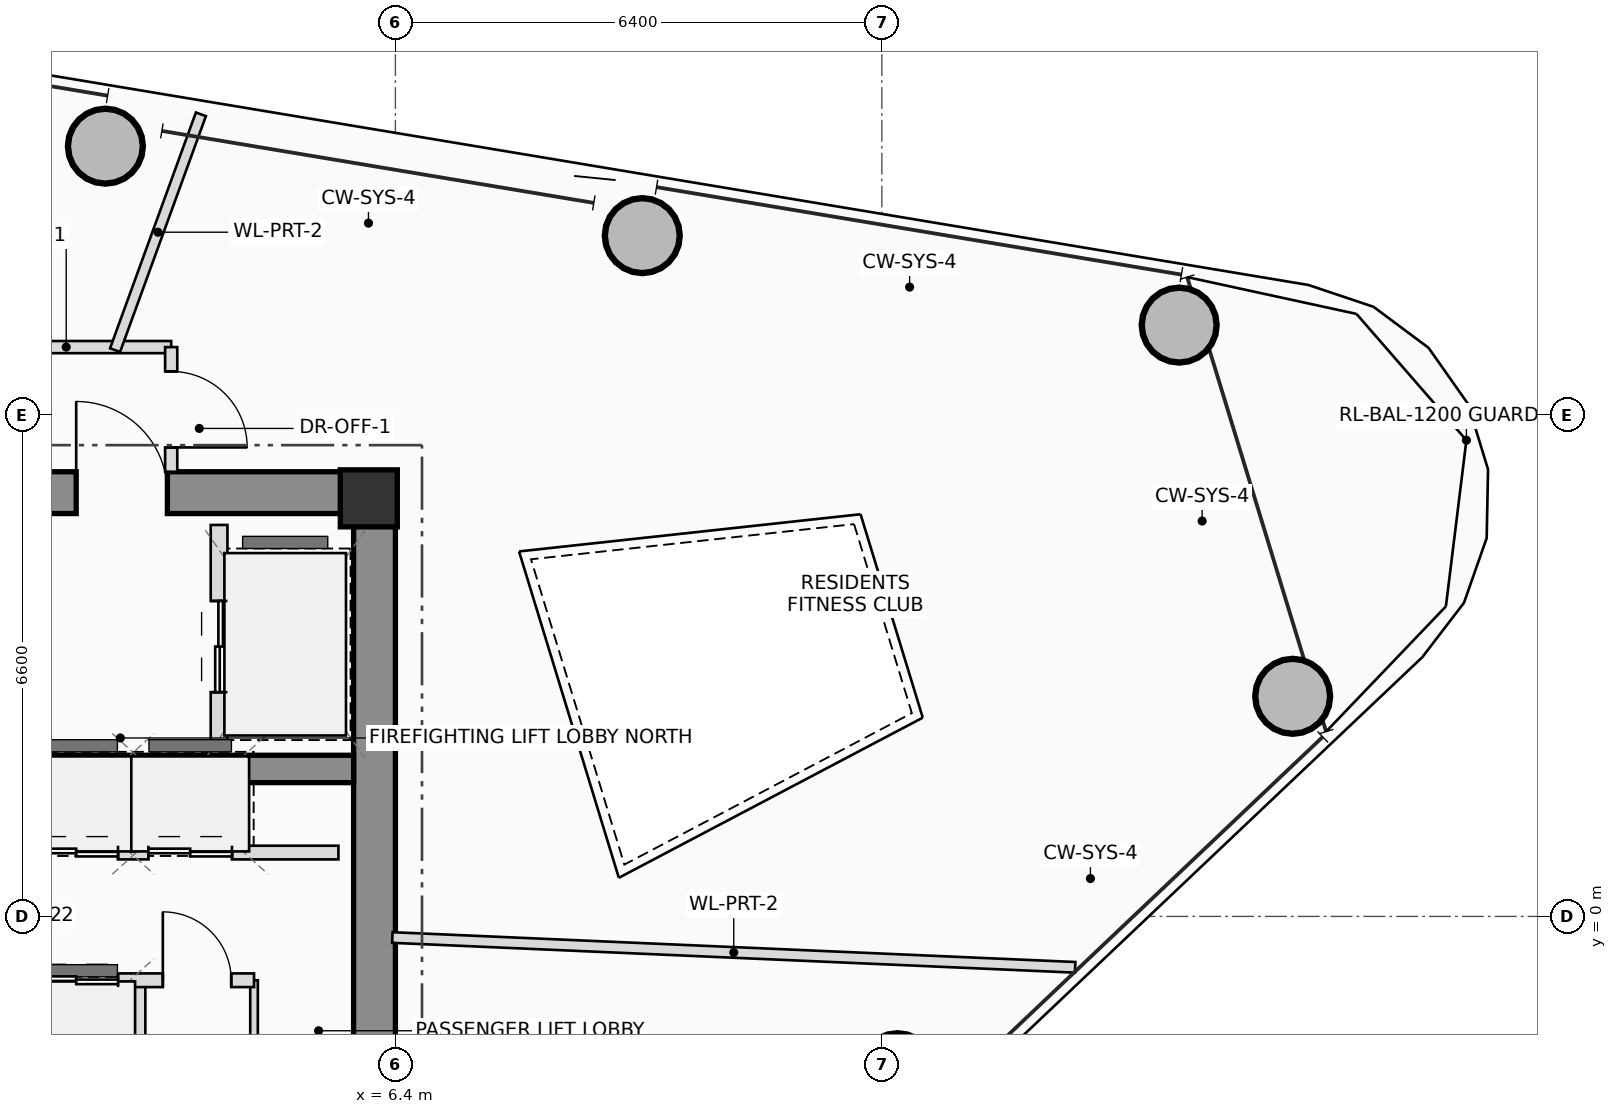
"""IFC4 building model, lengths in metres.
Left out: names, types, materials, properties, quantities, classifications, styles, units other than length and angle.
Written with IfcOpenShell. Run it as: python <this file> out.ifc"""

import sys

from ifc_helpers import new_model, si_unit, direction, frame, frame_2d, origin, origin_2d, place, context, subcontext, project, spatial, rectangle, hollow_circle, extrude, source, transform, mapped, element, fill, save


model = new_model("IFC4")
c1 = context("Model", 3, precision=1e-05, world=origin(), true_north=direction((0.0, 1.0)))
c2 = subcontext(c1, "Body", "Model", "MODEL_VIEW")
j1 = project(units=[si_unit("LENGTHUNIT", "METRE"), si_unit("PLANEANGLEUNIT", "RADIAN")], contexts=[c1])
p1 = place(None, origin())
s1 = spatial("IfcSite", under=j1, at=p1, CompositionType="ELEMENT")
p2 = place(p1, origin())
s2 = spatial("IfcBuilding", under=s1, at=p2, CompositionType="ELEMENT")
p3 = place(p2, frame((0.0, 0.0, 235.45)))
s3 = spatial("IfcBuildingStorey", under=s2, at=p3, CompositionType="ELEMENT", Elevation=235.45)
m1 = source(origin(), c2, "Body", "SweptSolid", [
    extrude(rectangle(XDim=0.75, YDim=0.75, at=origin_2d()), origin(), (0.0, 0.0, 1.0), 3.4),
])
p4 = place(p3, frame((6.05, 5.5, 0.0), z_axis=(0.0, 0.0, 1.0), x_axis=(1.0, 0.0, 0.0)))
e1 = element("IfcColumn", 1, at=p4, inside=s3, PredefinedType="COLUMN", context=c2, shape_type="MappedRepresentation", body=[
    mapped(m1, transform((0.0, 0.0, 0.0), scale=1.0)),
])
p5 = place(p3, frame((-6.4, 5.575, 0.0), z_axis=(0.0, 0.0, 1.0), x_axis=(1.0, 0.0, 0.0)))
e2 = element("IfcWall", 2, at=p5, inside=s3, PredefinedType="SHEAR", context=c2, shape_type="SweptSolid", body=[
    extrude(rectangle(XDim=12.8, YDim=0.55, at=frame_2d((6.4, 0.0))), origin(), (0.0, 0.0, 1.0), 3.4),
])
p6 = place(p5, frame((8.6, 0.0, 0.0)))
e3 = element("IfcOpeningElement", 3, at=p6, cuts=e2, PredefinedType="OPENING", context=c2, shape_type="SweptSolid", body=[
    extrude(rectangle(XDim=1.2, YDim=2.2, at=frame_2d((0.6, 1.1))), frame((0.0, 0.285, 0.0), z_axis=(0.0, -1.0, 0.0), x_axis=(1.0, 0.0, 0.0)), (0.0, 0.0, 1.0), 0.57),
])
p7 = place(p3, frame((6.125, -5.3, 0.0), z_axis=(0.0, 0.0, 1.0), x_axis=(0.0, 1.0, 0.0)))
e4 = element("IfcWall", 4, at=p7, inside=s3, PredefinedType="SHEAR", context=c2, shape_type="SweptSolid", body=[
    extrude(rectangle(XDim=10.6, YDim=0.55, at=frame_2d((5.3, 0.0))), origin(), (0.0, 0.0, 1.0), 3.4),
])
p8 = place(p3, frame((-5.85, 1.94, 0.0), z_axis=(0.0, 0.0, 1.0), x_axis=(1.0, 0.0, 0.0)))
e5 = element("IfcWall", 5, at=p8, inside=s3, PredefinedType="SHEAR", context=c2, shape_type="SweptSolid", body=[
    extrude(rectangle(XDim=11.7, YDim=0.36, at=frame_2d((5.85, 0.0))), origin(), (0.0, 0.0, 1.0), 3.4),
])
m2 = source(origin(), c2, "Body", "SweptSolid", [
    extrude(hollow_circle(Radius=0.5, WallThickness=0.04, at=origin_2d()), origin(), (0.0, 0.0, 1.0), 3.4),
])
for number, where, z_axis, x_axis in (
    (6, (13.007, -2.03, 0.0), (0.0, 0.0, 1.0), (1.0, 0.0, 0.0)),
    (7, (18.205, 2.896, 0.0), (0.0, 0.0, 1.0), (1.0, 0.0, 0.0)),
    (8, (16.712, 7.779, 0.0), (0.0, 0.0, 1.0), (1.0, 0.0, 0.0)),
    (9, (9.648, 8.957, 0.0), (0.0, 0.0, 1.0), (1.0, 0.0, 0.0)),
    (10, (2.584, 10.134, 0.0), (0.0, 0.0, 1.0), (1.0, 0.0, 0.0)),
):
    element("IfcColumn", number, at=place(p3, frame(where, z_axis=z_axis, x_axis=x_axis)), inside=s3, PredefinedType="COLUMN", context=c2, shape_type="MappedRepresentation", body=[
        mapped(m2, transform((0.0, 0.0, 0.0), scale=1.0)),
    ])
p9 = place(p3, frame((4.08, 2.2, 0.0), z_axis=(0.0, 0.0, 1.0), x_axis=(0.0, 1.0, 0.0)))
e11 = element("IfcWall", 11, at=p9, inside=s3, PredefinedType="PLUMBINGWALL", context=c2, shape_type="SweptSolid", body=[
    extrude(rectangle(XDim=2.95, YDim=0.22, at=frame_2d((1.475, 0.0))), origin(), (0.0, 0.0, 1.0), 3.2),
])
p10 = place(p9, frame((0.75, 0.0, 0.0)))
e12 = element("IfcOpeningElement", 12, at=p10, cuts=e11, PredefinedType="OPENING", context=c2, shape_type="SweptSolid", body=[
    extrude(rectangle(XDim=1.2, YDim=2.25, at=frame_2d((0.6, 1.125))), frame((0.0, 0.12, 0.0), z_axis=(0.0, -1.0, 0.0), x_axis=(1.0, 0.0, 0.0)), (0.0, 0.0, 1.0), 0.24),
])
for number, where, z_axis, x_axis in (
    (13, (3.02, 0.84, 0.0), (0.0, 0.0, 1.0), (0.0, 1.0, 0.0)),
    (14, (4.38, 0.84, 0.0), (0.0, 0.0, 1.0), (0.0, 1.0, 0.0)),
    (15, (3.02, -1.82, 0.0), (0.0, 0.0, 1.0), (0.0, 1.0, 0.0)),
):
    element("IfcWall", number, at=place(p3, frame(where, z_axis=z_axis, x_axis=x_axis)), inside=s3, PredefinedType="PLUMBINGWALL", context=c2, shape_type="SweptSolid", body=[
        extrude(rectangle(XDim=0.98, YDim=0.18, at=frame_2d((0.49, 0.0))), origin(), (0.0, 0.0, 1.0), 3.2),
    ])
p11 = place(p3, frame((4.54, -1.82, 0.0), z_axis=(0.0, 0.0, 1.0), x_axis=(0.0, 1.0, 0.0)))
e16 = element("IfcWall", 16, at=p11, inside=s3, PredefinedType="PARTITIONING", context=c2, shape_type="SweptSolid", body=[
    extrude(rectangle(XDim=0.98, YDim=0.1, at=frame_2d((0.49, 0.0))), origin(), (0.0, 0.0, 1.0), 3.2),
])
p12 = place(p3, frame((-5.68, 0.84, 0.0), z_axis=(0.0, 0.0, 1.0), x_axis=(1.0, 0.0, 0.0)))
e17 = element("IfcWall", 17, at=p12, inside=s3, PredefinedType="PLUMBINGWALL", context=c2, shape_type="SweptSolid", body=[
    extrude(rectangle(XDim=11.33, YDim=0.18, at=frame_2d((5.665, 0.0))), origin(), (0.0, 0.0, 1.0), 3.2),
])
p13 = place(p12, frame((3.13, 0.0, 0.0)))
e18 = element("IfcOpeningElement", 18, at=p13, cuts=e17, PredefinedType="OPENING", context=c2, shape_type="SweptSolid", body=[
    extrude(rectangle(XDim=0.9, YDim=2.05, at=frame_2d((0.45, 1.025))), frame((0.0, 0.1, 0.0), z_axis=(0.0, -1.0, 0.0), x_axis=(1.0, 0.0, 0.0)), (0.0, 0.0, 1.0), 0.2),
])
p14 = place(p12, frame((7.33, 0.0, 0.0)))
e19 = element("IfcOpeningElement", 19, at=p14, cuts=e17, PredefinedType="OPENING", context=c2, shape_type="SweptSolid", body=[
    extrude(rectangle(XDim=1.1, YDim=2.2, at=frame_2d((0.55, 1.1))), frame((0.0, 0.1, 0.0), z_axis=(0.0, -1.0, 0.0), x_axis=(1.0, 0.0, 0.0)), (0.0, 0.0, 1.0), 0.2),
])
p15 = place(p12, frame((8.83, 0.0, 0.0)))
e20 = element("IfcOpeningElement", 20, at=p15, cuts=e17, PredefinedType="OPENING", context=c2, shape_type="SweptSolid", body=[
    extrude(rectangle(XDim=1.1, YDim=2.2, at=frame_2d((0.55, 1.1))), frame((0.0, 0.1, 0.0), z_axis=(0.0, -1.0, 0.0), x_axis=(1.0, 0.0, 0.0)), (0.0, 0.0, 1.0), 0.2),
])
p16 = place(p3, frame((-5.68, -0.84, 0.0), z_axis=(0.0, 0.0, 1.0), x_axis=(1.0, 0.0, 0.0)))
e21 = element("IfcWall", 21, at=p16, inside=s3, PredefinedType="PLUMBINGWALL", context=c2, shape_type="SweptSolid", body=[
    extrude(rectangle(XDim=10.22, YDim=0.18, at=frame_2d((5.11, 0.0))), origin(), (0.0, 0.0, 1.0), 3.2),
])
p17 = place(p16, frame((1.88, 0.0, 0.0)))
e22 = element("IfcOpeningElement", 22, at=p17, cuts=e21, PredefinedType="OPENING", context=c2, shape_type="SweptSolid", body=[
    extrude(rectangle(XDim=0.9, YDim=2.05, at=frame_2d((0.45, 1.025))), frame((0.0, 0.1, 0.0), z_axis=(0.0, -1.0, 0.0), x_axis=(1.0, 0.0, 0.0)), (0.0, 0.0, 1.0), 0.2),
])
p18 = place(p16, frame((5.35, 0.0, 0.0)))
e23 = element("IfcOpeningElement", 23, at=p18, cuts=e21, PredefinedType="OPENING", context=c2, shape_type="SweptSolid", body=[
    extrude(rectangle(XDim=0.9, YDim=2.05, at=frame_2d((0.45, 1.025))), frame((0.0, 0.1, 0.0), z_axis=(0.0, -1.0, 0.0), x_axis=(1.0, 0.0, 0.0)), (0.0, 0.0, 1.0), 0.2),
])
p19 = place(p16, frame((7.33, 0.0, 0.0)))
e24 = element("IfcOpeningElement", 24, at=p19, cuts=e21, PredefinedType="OPENING", context=c2, shape_type="SweptSolid", body=[
    extrude(rectangle(XDim=1.1, YDim=2.2, at=frame_2d((0.55, 1.1))), frame((0.0, 0.1, 0.0), z_axis=(0.0, -1.0, 0.0), x_axis=(1.0, 0.0, 0.0)), (0.0, 0.0, 1.0), 0.2),
])
p20 = place(p16, frame((9.02, 0.0, 0.0)))
e25 = element("IfcOpeningElement", 25, at=p20, cuts=e21, PredefinedType="OPENING", context=c2, shape_type="SweptSolid", body=[
    extrude(rectangle(XDim=0.9, YDim=2.05, at=frame_2d((0.45, 1.025))), frame((0.0, 0.1, 0.0), z_axis=(0.0, -1.0, 0.0), x_axis=(1.0, 0.0, 0.0)), (0.0, 0.0, 1.0), 0.2),
])
p21 = place(p3, frame((-6.36, 7.49, 0.0), z_axis=(0.0, 0.0, 1.0), x_axis=(1.0, 0.0, 0.0)))
e26 = element("IfcWall", 26, at=p21, inside=s3, PredefinedType="PARTITIONING", context=c2, shape_type="SweptSolid", body=[
    extrude(rectangle(XDim=9.81, YDim=0.16, at=frame_2d((4.905, 0.0))), origin(), (0.0, 0.0, 1.0), 2.605),
])
p22 = place(p21, frame((1.867, 0.0, 0.0)))
e27 = element("IfcOpeningElement", 27, at=p22, cuts=e26, PredefinedType="OPENING", context=c2, shape_type="SweptSolid", body=[
    extrude(rectangle(XDim=1.0, YDim=2.25, at=frame_2d((0.5, 1.125))), frame((0.0, 0.09, 0.0), z_axis=(0.0, -1.0, 0.0), x_axis=(1.0, 0.0, 0.0)), (0.0, 0.0, 1.0), 0.18),
])
p23 = place(p21, frame((5.897, 0.0, 0.0)))
e28 = element("IfcOpeningElement", 28, at=p23, cuts=e26, PredefinedType="OPENING", context=c2, shape_type="SweptSolid", body=[
    extrude(rectangle(XDim=1.0, YDim=2.25, at=frame_2d((0.5, 1.125))), frame((0.0, 0.09, 0.0), z_axis=(0.0, -1.0, 0.0), x_axis=(1.0, 0.0, 0.0)), (0.0, 0.0, 1.0), 0.18),
])
p24 = place(p3, frame((3.45, 7.49, 0.0), z_axis=(0.0, 0.0, 1.0), x_axis=(0.0, -1.0, 0.0)))
e29 = element("IfcWall", 29, at=p24, inside=s3, PredefinedType="PARTITIONING", context=c2, shape_type="SweptSolid", body=[
    extrude(rectangle(XDim=1.64, YDim=0.16, at=frame_2d((0.82, 0.0))), origin(), (0.0, 0.0, 1.0), 3.2),
])
p25 = place(p24, frame((0.32, 0.0, 0.0)))
e30 = element("IfcOpeningElement", 30, at=p25, cuts=e29, PredefinedType="OPENING", context=c2, shape_type="SweptSolid", body=[
    extrude(rectangle(XDim=1.0, YDim=2.25, at=frame_2d((0.5, 1.125))), frame((0.0, 0.09, 0.0), z_axis=(0.0, -1.0, 0.0), x_axis=(1.0, 0.0, 0.0)), (0.0, 0.0, 1.0), 0.18),
])
p26 = place(p3, frame((6.36, -0.278, 0.0), z_axis=(0.0, 0.0, 1.0), x_axis=(0.99904773846, -0.043630451279, 0.0)))
e31 = element("IfcWall", 31, at=p26, inside=s3, PredefinedType="PARTITIONING", context=c2, shape_type="SweptSolid", body=[
    extrude(rectangle(XDim=8.992, YDim=0.14, at=frame_2d((4.496, 0.0))), origin(), (0.0, 0.0, 1.0), 2.605),
])
p27 = place(p3, frame((2.712, 7.45, 0.0), z_axis=(0.0, 0.0, 1.0), x_axis=(0.341974588874, 0.9397092, 0.0)))
e32 = element("IfcWall", 32, at=p27, inside=s3, PredefinedType="PARTITIONING", context=c2, shape_type="SweptSolid", body=[
    extrude(rectangle(XDim=3.302, YDim=0.14, at=frame_2d((1.651, 0.0))), origin(), (0.0, 0.0, 1.0), 2.605),
])
p28 = place(p6, origin())
e33 = element("IfcDoor", 33, at=p28, inside=s3, OperationType="SINGLE_SWING_LEFT", PredefinedType="DOOR", context=c2, shape_type="SweptSolid", body=[
    extrude(rectangle(XDim=1.2, YDim=2.2, at=frame_2d((0.6, 1.1))), frame((0.0, 0.025, 0.0), z_axis=(0.0, -1.0, 0.0), x_axis=(1.0, 0.0, 0.0)), (0.0, 0.0, 1.0), 0.05),
])
fill(e3, e33)
p29 = place(p10, origin())
e34 = element("IfcDoor", 34, at=p29, inside=s3, OperationType="DOUBLE_DOOR_SLIDING", PredefinedType="DOOR", context=c2, shape_type="SweptSolid", body=[
    extrude(rectangle(XDim=1.2, YDim=2.25, at=frame_2d((0.6, 1.125))), frame((0.0, 0.025, 0.0), z_axis=(0.0, -1.0, 0.0), x_axis=(1.0, 0.0, 0.0)), (0.0, 0.0, 1.0), 0.05),
])
fill(e12, e34)
p30 = place(p14, origin())
e35 = element("IfcDoor", 35, at=p30, inside=s3, OperationType="DOUBLE_DOOR_SLIDING", PredefinedType="DOOR", context=c2, shape_type="SweptSolid", body=[
    extrude(rectangle(XDim=1.1, YDim=2.2, at=frame_2d((0.55, 1.1))), frame((0.0, 0.025, 0.0), z_axis=(0.0, -1.0, 0.0), x_axis=(1.0, 0.0, 0.0)), (0.0, 0.0, 1.0), 0.05),
])
fill(e19, e35)
p31 = place(p15, origin())
e36 = element("IfcDoor", 36, at=p31, inside=s3, OperationType="DOUBLE_DOOR_SLIDING", PredefinedType="DOOR", context=c2, shape_type="SweptSolid", body=[
    extrude(rectangle(XDim=1.1, YDim=2.2, at=frame_2d((0.55, 1.1))), frame((0.0, 0.025, 0.0), z_axis=(0.0, -1.0, 0.0), x_axis=(1.0, 0.0, 0.0)), (0.0, 0.0, 1.0), 0.05),
])
fill(e20, e36)
p32 = place(p19, origin())
e37 = element("IfcDoor", 37, at=p32, inside=s3, OperationType="DOUBLE_DOOR_SLIDING", PredefinedType="DOOR", context=c2, shape_type="SweptSolid", body=[
    extrude(rectangle(XDim=1.1, YDim=2.2, at=frame_2d((0.55, 1.1))), frame((0.0, 0.025, 0.0), z_axis=(0.0, -1.0, 0.0), x_axis=(1.0, 0.0, 0.0)), (0.0, 0.0, 1.0), 0.05),
])
fill(e24, e37)
p33 = place(p20, origin())
e38 = element("IfcDoor", 38, at=p33, inside=s3, OperationType="SINGLE_SWING_LEFT", PredefinedType="DOOR", context=c2, shape_type="SweptSolid", body=[
    extrude(rectangle(XDim=0.9, YDim=2.05, at=frame_2d((0.45, 1.025))), frame((0.0, 0.025, 0.0), z_axis=(0.0, -1.0, 0.0), x_axis=(1.0, 0.0, 0.0)), (0.0, 0.0, 1.0), 0.05),
])
fill(e25, e38)
p34 = place(p25, origin())
e39 = element("IfcDoor", 39, at=p34, inside=s3, OperationType="SINGLE_SWING_RIGHT", PredefinedType="DOOR", context=c2, shape_type="SweptSolid", body=[
    extrude(rectangle(XDim=1.0, YDim=2.25, at=frame_2d((0.5, 1.125))), frame((0.0, 0.025, 0.0), z_axis=(0.0, -1.0, 0.0), x_axis=(1.0, 0.0, 0.0)), (0.0, 0.0, 1.0), 0.05),
])
fill(e30, e39)
save(model, sys.argv[1])
